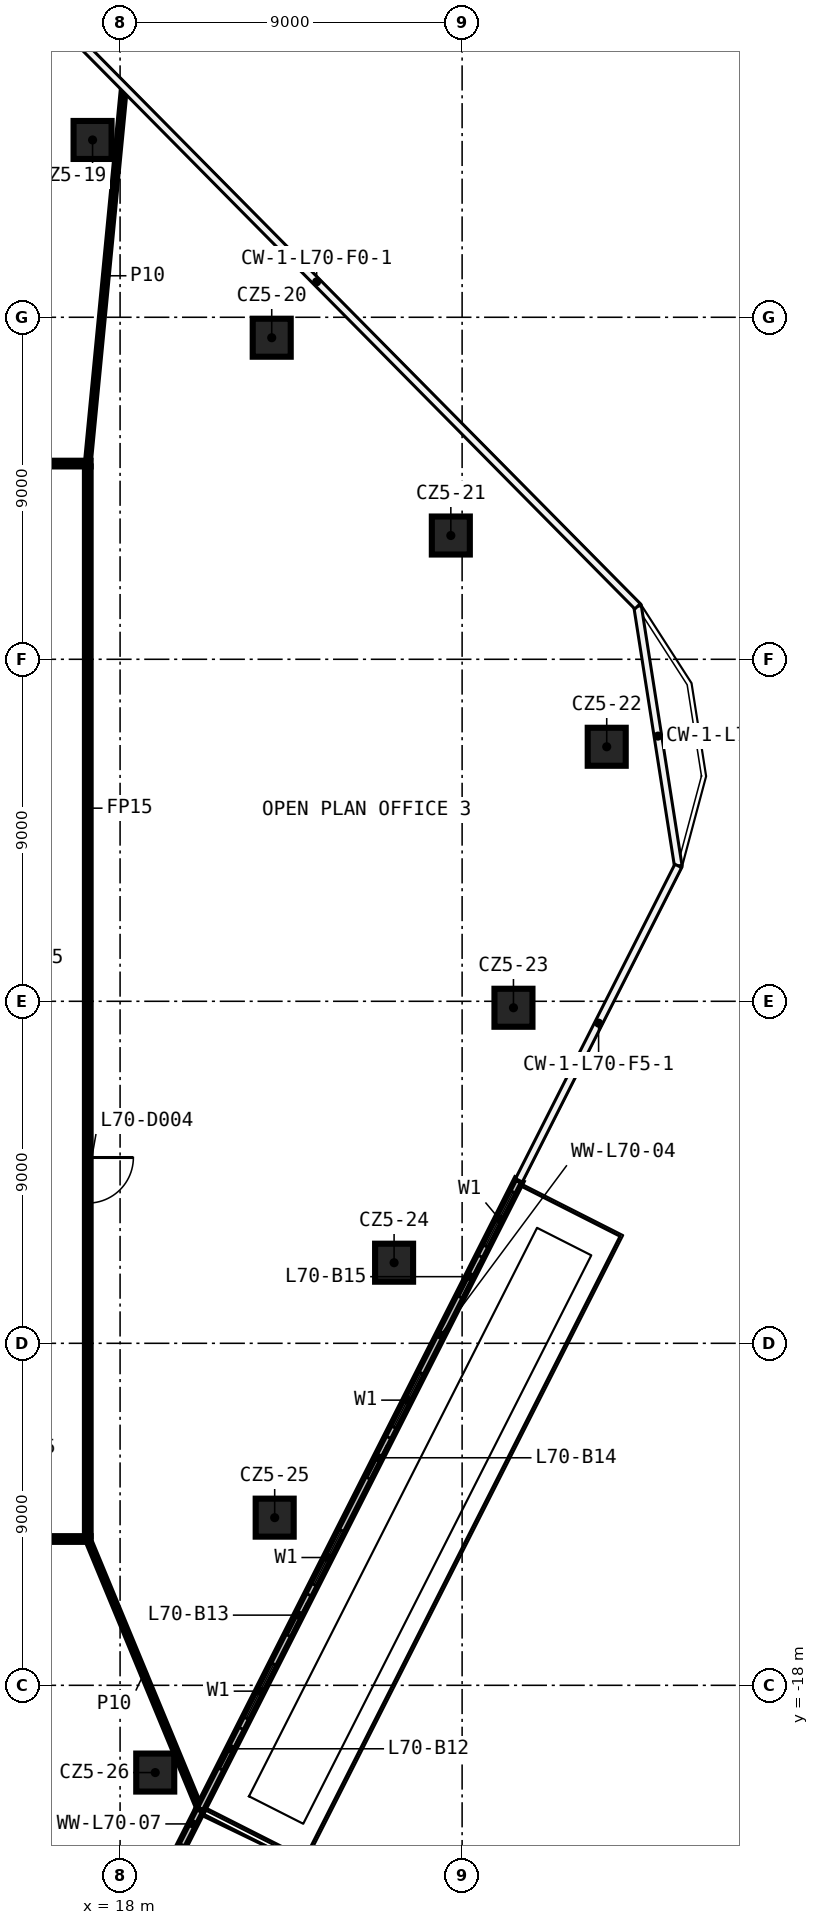
"""IFC4 building model, lengths in metres.
Left out: names, types, materials, properties, quantities, classifications, styles, units other than length and angle.
Written with IfcOpenShell. Run it as: python <this file> out.ifc"""

import sys

from ifc_helpers import new_model, si_unit, direction, frame, frame_2d, origin, origin_2d, place, context, subcontext, project, spatial, rectangle, extrude, element, fill, save


model = new_model("IFC4")
c1 = context("Model", 3, precision=1e-05, world=origin(), true_north=direction((0.0, 1.0)))
c2 = subcontext(c1, "Body", "Model", "MODEL_VIEW")
j1 = project(units=[si_unit("LENGTHUNIT", "METRE"), si_unit("PLANEANGLEUNIT", "RADIAN")], contexts=[c1])
p1 = place(None, origin())
s1 = spatial("IfcSite", under=j1, at=p1, CompositionType="ELEMENT")
p2 = place(p1, origin())
s2 = spatial("IfcBuilding", under=s1, at=p2, CompositionType="ELEMENT")
p3 = place(p2, frame((0.0, 0.0, 327.8)))
s3 = spatial("IfcBuildingStorey", under=s2, at=p3, CompositionType="ELEMENT", Elevation=327.8)
for number, where, z_axis, x_axis in (
    (1, (17.276, 22.666, 0.0), (0.0, 0.0, 1.0), (1.0, 0.0, 0.0)),
    (2, (21.99, 17.462, 0.0), (0.0, 0.0, 1.0), (1.0, 0.0, 0.0)),
    (3, (26.703, 12.257, 0.0), (0.0, 0.0, 1.0), (1.0, 0.0, 0.0)),
    (4, (30.805, 6.698, 0.0), (0.0, 0.0, 1.0), (1.0, 0.0, 0.0)),
    (5, (28.351, -0.17, 0.0), (0.0, 0.0, 1.0), (1.0, 0.0, 0.0)),
    (6, (25.21, -6.879, 0.0), (0.0, 0.0, 1.0), (1.0, 0.0, 0.0)),
    (7, (22.068, -13.588, 0.0), (0.0, 0.0, 1.0), (1.0, 0.0, 0.0)),
    (8, (18.925, -20.296, 0.0), (0.0, 0.0, 1.0), (1.0, 0.0, 0.0)),
):
    element("IfcColumn", number, at=place(p3, frame(where, z_axis=z_axis, x_axis=x_axis)), inside=s3, PredefinedType="COLUMN", context=c2, shape_type="SweptSolid", body=[
        extrude(rectangle(XDim=1.0, YDim=1.0, at=origin_2d()), origin(), (0.0, 0.0, 1.0), 3.82),
    ])
p4 = place(p3, frame((17.225, -14.15, 0.0), z_axis=(0.0, 0.0, 1.0), x_axis=(-1.0, 0.0, 0.0)))
e9 = element("IfcWall", 9, at=p4, inside=s3, PredefinedType="PARTITIONING", context=c2, shape_type="SweptSolid", body=[
    extrude(rectangle(XDim=34.45, YDim=0.15, at=frame_2d((17.225, 0.0))), origin(), (0.0, 0.0, 1.0), 3.82),
])
p5 = place(p4, frame((17.711, 0.0, 0.0)))
e10 = element("IfcOpeningElement", 10, at=p5, cuts=e9, PredefinedType="OPENING", context=c2, shape_type="SweptSolid", body=[
    extrude(rectangle(XDim=1.2, YDim=2.1, at=frame_2d((0.6, 1.05))), frame((0.0, 0.085, 0.0), z_axis=(0.0, -1.0, 0.0), x_axis=(1.0, 0.0, 0.0)), (0.0, 0.0, 1.0), 0.17),
])
p6 = place(p4, frame((4.094, 0.0, 0.0)))
e11 = element("IfcOpeningElement", 11, at=p6, cuts=e9, PredefinedType="OPENING", context=c2, shape_type="SweptSolid", body=[
    extrude(rectangle(XDim=1.2, YDim=2.1, at=frame_2d((0.6, 1.05))), frame((0.0, 0.085, 0.0), z_axis=(0.0, -1.0, 0.0), x_axis=(1.0, 0.0, 0.0)), (0.0, 0.0, 1.0), 0.17),
])
p7 = place(p3, frame((-17.225, 14.15, 0.0), z_axis=(0.0, 0.0, 1.0), x_axis=(1.0, 0.0, 0.0)))
e12 = element("IfcWall", 12, at=p7, inside=s3, PredefinedType="PARTITIONING", context=c2, shape_type="SweptSolid", body=[
    extrude(rectangle(XDim=34.45, YDim=0.15, at=frame_2d((17.225, 0.0))), origin(), (0.0, 0.0, 1.0), 3.82),
])
p8 = place(p7, frame((17.706, 0.0, 0.0)))
e13 = element("IfcOpeningElement", 13, at=p8, cuts=e12, PredefinedType="OPENING", context=c2, shape_type="SweptSolid", body=[
    extrude(rectangle(XDim=1.2, YDim=2.1, at=frame_2d((0.6, 1.05))), frame((0.0, 0.085, 0.0), z_axis=(0.0, -1.0, 0.0), x_axis=(1.0, 0.0, 0.0)), (0.0, 0.0, 1.0), 0.17),
])
p9 = place(p3, frame((17.15, 14.15, 0.0), z_axis=(0.0, 0.0, 1.0), x_axis=(0.095686172631, 0.995411551253, 0.0)))
e14 = element("IfcWall", 14, at=p9, inside=s3, PredefinedType="PARTITIONING", context=c2, shape_type="SweptSolid", body=[
    extrude(rectangle(XDim=9.93, YDim=0.1, at=frame_2d((4.965, 0.0))), origin(), (0.0, 0.0, 1.0), 3.82),
])
p10 = place(p3, frame((17.15, 14.075, 0.0), z_axis=(0.0, 0.0, 1.0), x_axis=(0.0, -1.0, 0.0)))
e15 = element("IfcWall", 15, at=p10, inside=s3, PredefinedType="PARTITIONING", context=c2, shape_type="SweptSolid", body=[
    extrude(rectangle(XDim=28.15, YDim=0.15, at=frame_2d((14.075, 0.0))), origin(), (0.0, 0.0, 1.0), 3.82),
])
p11 = place(p10, frame((18.186, 0.0, 0.0)))
e16 = element("IfcOpeningElement", 16, at=p11, cuts=e15, PredefinedType="OPENING", context=c2, shape_type="SweptSolid", body=[
    extrude(rectangle(XDim=1.2, YDim=2.1, at=frame_2d((0.6, 1.05))), frame((0.0, 0.085, 0.0), z_axis=(0.0, -1.0, 0.0), x_axis=(1.0, 0.0, 0.0)), (0.0, 0.0, 1.0), 0.17),
])
p12 = place(p3, frame((17.15, -14.15, 0.0), z_axis=(0.0, 0.0, 1.0), x_axis=(0.382693080748, -0.923875535961, 0.0)))
e17 = element("IfcWall", 17, at=p12, inside=s3, PredefinedType="PARTITIONING", context=c2, shape_type="SweptSolid", body=[
    extrude(rectangle(XDim=7.687, YDim=0.1, at=frame_2d((3.843, 0.0))), origin(), (0.0, 0.0, 1.0), 3.82),
])
p13 = place(p3, frame((20.102, -21.276, 0.0), z_axis=(0.0, 0.0, 1.0), x_axis=(0.451966467013, 0.892034927957, 0.0)))
e18 = element("IfcWall", 18, at=p13, inside=s3, PredefinedType="SOLIDWALL", context=c2, shape_type="SweptSolid", body=[
    extrude(rectangle(XDim=18.57, YDim=0.2, at=frame_2d((9.285, 0.0))), origin(), (0.0, 0.0, 1.0), 3.82),
])
p14 = place(p13, frame((2.7, 0.0, 0.6)))
e19 = element("IfcOpeningElement", 19, at=p14, cuts=e18, PredefinedType="OPENING", context=c2, shape_type="SweptSolid", body=[
    extrude(rectangle(XDim=1.6, YDim=2.4, at=frame_2d((0.8, 1.2))), frame((0.0, 0.11, 0.0), z_axis=(0.0, -1.0, 0.0), x_axis=(1.0, 0.0, 0.0)), (0.0, 0.0, 1.0), 0.22),
])
p15 = place(p13, frame((1.2, 0.0, 0.0)))
e20 = element("IfcOpeningElement", 20, at=p15, cuts=e18, PredefinedType="OPENING", context=c2, shape_type="SweptSolid", body=[
    extrude(rectangle(XDim=1.2, YDim=2.4, at=frame_2d((0.6, 1.2))), frame((0.0, 0.11, 0.0), z_axis=(0.0, -1.0, 0.0), x_axis=(1.0, 0.0, 0.0)), (0.0, 0.0, 1.0), 0.22),
])
p16 = place(p13, frame((6.643, 0.0, 0.6)))
e21 = element("IfcOpeningElement", 21, at=p16, cuts=e18, PredefinedType="OPENING", context=c2, shape_type="SweptSolid", body=[
    extrude(rectangle(XDim=1.6, YDim=2.4, at=frame_2d((0.8, 1.2))), frame((0.0, 0.11, 0.0), z_axis=(0.0, -1.0, 0.0), x_axis=(1.0, 0.0, 0.0)), (0.0, 0.0, 1.0), 0.22),
])
p17 = place(p13, frame((5.143, 0.0, 0.0)))
e22 = element("IfcOpeningElement", 22, at=p17, cuts=e18, PredefinedType="OPENING", context=c2, shape_type="SweptSolid", body=[
    extrude(rectangle(XDim=1.2, YDim=2.4, at=frame_2d((0.6, 1.2))), frame((0.0, 0.11, 0.0), z_axis=(0.0, -1.0, 0.0), x_axis=(1.0, 0.0, 0.0)), (0.0, 0.0, 1.0), 0.22),
])
p18 = place(p13, frame((11.285, 0.0, 0.6)))
e23 = element("IfcOpeningElement", 23, at=p18, cuts=e18, PredefinedType="OPENING", context=c2, shape_type="SweptSolid", body=[
    extrude(rectangle(XDim=1.6, YDim=2.4, at=frame_2d((0.8, 1.2))), frame((0.0, 0.11, 0.0), z_axis=(0.0, -1.0, 0.0), x_axis=(1.0, 0.0, 0.0)), (0.0, 0.0, 1.0), 0.22),
])
p19 = place(p13, frame((9.785, 0.0, 0.0)))
e24 = element("IfcOpeningElement", 24, at=p19, cuts=e18, PredefinedType="OPENING", context=c2, shape_type="SweptSolid", body=[
    extrude(rectangle(XDim=1.2, YDim=2.4, at=frame_2d((0.6, 1.2))), frame((0.0, 0.11, 0.0), z_axis=(0.0, -1.0, 0.0), x_axis=(1.0, 0.0, 0.0)), (0.0, 0.0, 1.0), 0.22),
])
p20 = place(p13, frame((16.627, 0.0, 0.6)))
e25 = element("IfcOpeningElement", 25, at=p20, cuts=e18, PredefinedType="OPENING", context=c2, shape_type="SweptSolid", body=[
    extrude(rectangle(XDim=1.6, YDim=2.4, at=frame_2d((0.8, 1.2))), frame((0.0, 0.11, 0.0), z_axis=(0.0, -1.0, 0.0), x_axis=(1.0, 0.0, 0.0)), (0.0, 0.0, 1.0), 0.22),
])
p21 = place(p13, frame((15.127, 0.0, 0.0)))
e26 = element("IfcOpeningElement", 26, at=p21, cuts=e18, PredefinedType="OPENING", context=c2, shape_type="SweptSolid", body=[
    extrude(rectangle(XDim=1.2, YDim=2.4, at=frame_2d((0.6, 1.2))), frame((0.0, 0.11, 0.0), z_axis=(0.0, -1.0, 0.0), x_axis=(1.0, 0.0, 0.0)), (0.0, 0.0, 1.0), 0.22),
])
p22 = place(p3, frame((18.008, -25.409, 0.0), z_axis=(0.0, 0.0, 1.0), x_axis=(0.451970383378, 0.892032943646, 0.0)))
e27 = element("IfcWall", 27, at=p22, inside=s3, PredefinedType="SOLIDWALL", context=c2, shape_type="SweptSolid", body=[
    extrude(rectangle(XDim=4.634, YDim=0.2, at=frame_2d((2.317, 0.0))), origin(), (0.0, 0.0, 1.0), 3.82),
])
p23 = place(p22, frame((2.0, 0.0, 0.6)))
e28 = element("IfcOpeningElement", 28, at=p23, cuts=e27, PredefinedType="OPENING", context=c2, shape_type="SweptSolid", body=[
    extrude(rectangle(XDim=1.6, YDim=2.4, at=frame_2d((0.8, 1.2))), frame((0.0, 0.11, 0.0), z_axis=(0.0, -1.0, 0.0), x_axis=(1.0, 0.0, 0.0)), (0.0, 0.0, 1.0), 0.22),
])
p24 = place(p22, frame((0.5, 0.0, 0.0)))
e29 = element("IfcOpeningElement", 29, at=p24, cuts=e27, PredefinedType="OPENING", context=c2, shape_type="SweptSolid", body=[
    extrude(rectangle(XDim=1.2, YDim=2.4, at=frame_2d((0.6, 1.2))), frame((0.0, 0.11, 0.0), z_axis=(0.0, -1.0, 0.0), x_axis=(1.0, 0.0, 0.0)), (0.0, 0.0, 1.0), 0.22),
])
p25 = place(p11, origin())
e30 = element("IfcDoor", 30, at=p25, inside=s3, OperationType="SINGLE_SWING_LEFT", PredefinedType="DOOR", context=c2, shape_type="SweptSolid", body=[
    extrude(rectangle(XDim=1.2, YDim=2.1, at=frame_2d((0.6, 1.05))), frame((0.0, 0.025, 0.0), z_axis=(0.0, -1.0, 0.0), x_axis=(1.0, 0.0, 0.0)), (0.0, 0.0, 1.0), 0.05),
])
fill(e16, e30)
p26 = place(p14, origin())
e31 = element("IfcWindow", 31, at=p26, inside=s3, PartitioningType="SINGLE_PANEL", PredefinedType="WINDOW", context=c2, shape_type="SweptSolid", body=[
    extrude(rectangle(XDim=1.6, YDim=2.4, at=frame_2d((0.8, 1.2))), frame((0.0, 0.03, 0.0), z_axis=(0.0, -1.0, 0.0), x_axis=(1.0, 0.0, 0.0)), (0.0, 0.0, 1.0), 0.06),
])
fill(e19, e31)
p27 = place(p15, origin())
e32 = element("IfcDoor", 32, at=p27, inside=s3, OperationType="SLIDING_TO_LEFT", PredefinedType="DOOR", context=c2, shape_type="SweptSolid", body=[
    extrude(rectangle(XDim=1.2, YDim=2.4, at=frame_2d((0.6, 1.2))), frame((0.0, 0.025, 0.0), z_axis=(0.0, -1.0, 0.0), x_axis=(1.0, 0.0, 0.0)), (0.0, 0.0, 1.0), 0.05),
])
fill(e20, e32)
p28 = place(p16, origin())
e33 = element("IfcWindow", 33, at=p28, inside=s3, PartitioningType="SINGLE_PANEL", PredefinedType="WINDOW", context=c2, shape_type="SweptSolid", body=[
    extrude(rectangle(XDim=1.6, YDim=2.4, at=frame_2d((0.8, 1.2))), frame((0.0, 0.03, 0.0), z_axis=(0.0, -1.0, 0.0), x_axis=(1.0, 0.0, 0.0)), (0.0, 0.0, 1.0), 0.06),
])
fill(e21, e33)
p29 = place(p17, origin())
e34 = element("IfcDoor", 34, at=p29, inside=s3, OperationType="SLIDING_TO_LEFT", PredefinedType="DOOR", context=c2, shape_type="SweptSolid", body=[
    extrude(rectangle(XDim=1.2, YDim=2.4, at=frame_2d((0.6, 1.2))), frame((0.0, 0.025, 0.0), z_axis=(0.0, -1.0, 0.0), x_axis=(1.0, 0.0, 0.0)), (0.0, 0.0, 1.0), 0.05),
])
fill(e22, e34)
p30 = place(p18, origin())
e35 = element("IfcWindow", 35, at=p30, inside=s3, PartitioningType="SINGLE_PANEL", PredefinedType="WINDOW", context=c2, shape_type="SweptSolid", body=[
    extrude(rectangle(XDim=1.6, YDim=2.4, at=frame_2d((0.8, 1.2))), frame((0.0, 0.03, 0.0), z_axis=(0.0, -1.0, 0.0), x_axis=(1.0, 0.0, 0.0)), (0.0, 0.0, 1.0), 0.06),
])
fill(e23, e35)
p31 = place(p19, origin())
e36 = element("IfcDoor", 36, at=p31, inside=s3, OperationType="SLIDING_TO_LEFT", PredefinedType="DOOR", context=c2, shape_type="SweptSolid", body=[
    extrude(rectangle(XDim=1.2, YDim=2.4, at=frame_2d((0.6, 1.2))), frame((0.0, 0.025, 0.0), z_axis=(0.0, -1.0, 0.0), x_axis=(1.0, 0.0, 0.0)), (0.0, 0.0, 1.0), 0.05),
])
fill(e24, e36)
p32 = place(p20, origin())
e37 = element("IfcWindow", 37, at=p32, inside=s3, PartitioningType="SINGLE_PANEL", PredefinedType="WINDOW", context=c2, shape_type="SweptSolid", body=[
    extrude(rectangle(XDim=1.6, YDim=2.4, at=frame_2d((0.8, 1.2))), frame((0.0, 0.03, 0.0), z_axis=(0.0, -1.0, 0.0), x_axis=(1.0, 0.0, 0.0)), (0.0, 0.0, 1.0), 0.06),
])
fill(e25, e37)
p33 = place(p21, origin())
e38 = element("IfcDoor", 38, at=p33, inside=s3, OperationType="SLIDING_TO_LEFT", PredefinedType="DOOR", context=c2, shape_type="SweptSolid", body=[
    extrude(rectangle(XDim=1.2, YDim=2.4, at=frame_2d((0.6, 1.2))), frame((0.0, 0.025, 0.0), z_axis=(0.0, -1.0, 0.0), x_axis=(1.0, 0.0, 0.0)), (0.0, 0.0, 1.0), 0.05),
])
fill(e26, e38)
p34 = place(p23, origin())
e39 = element("IfcWindow", 39, at=p34, inside=s3, PartitioningType="SINGLE_PANEL", PredefinedType="WINDOW", context=c2, shape_type="SweptSolid", body=[
    extrude(rectangle(XDim=1.6, YDim=2.4, at=frame_2d((0.8, 1.2))), frame((0.0, 0.03, 0.0), z_axis=(0.0, -1.0, 0.0), x_axis=(1.0, 0.0, 0.0)), (0.0, 0.0, 1.0), 0.06),
])
fill(e28, e39)
save(model, sys.argv[1])
